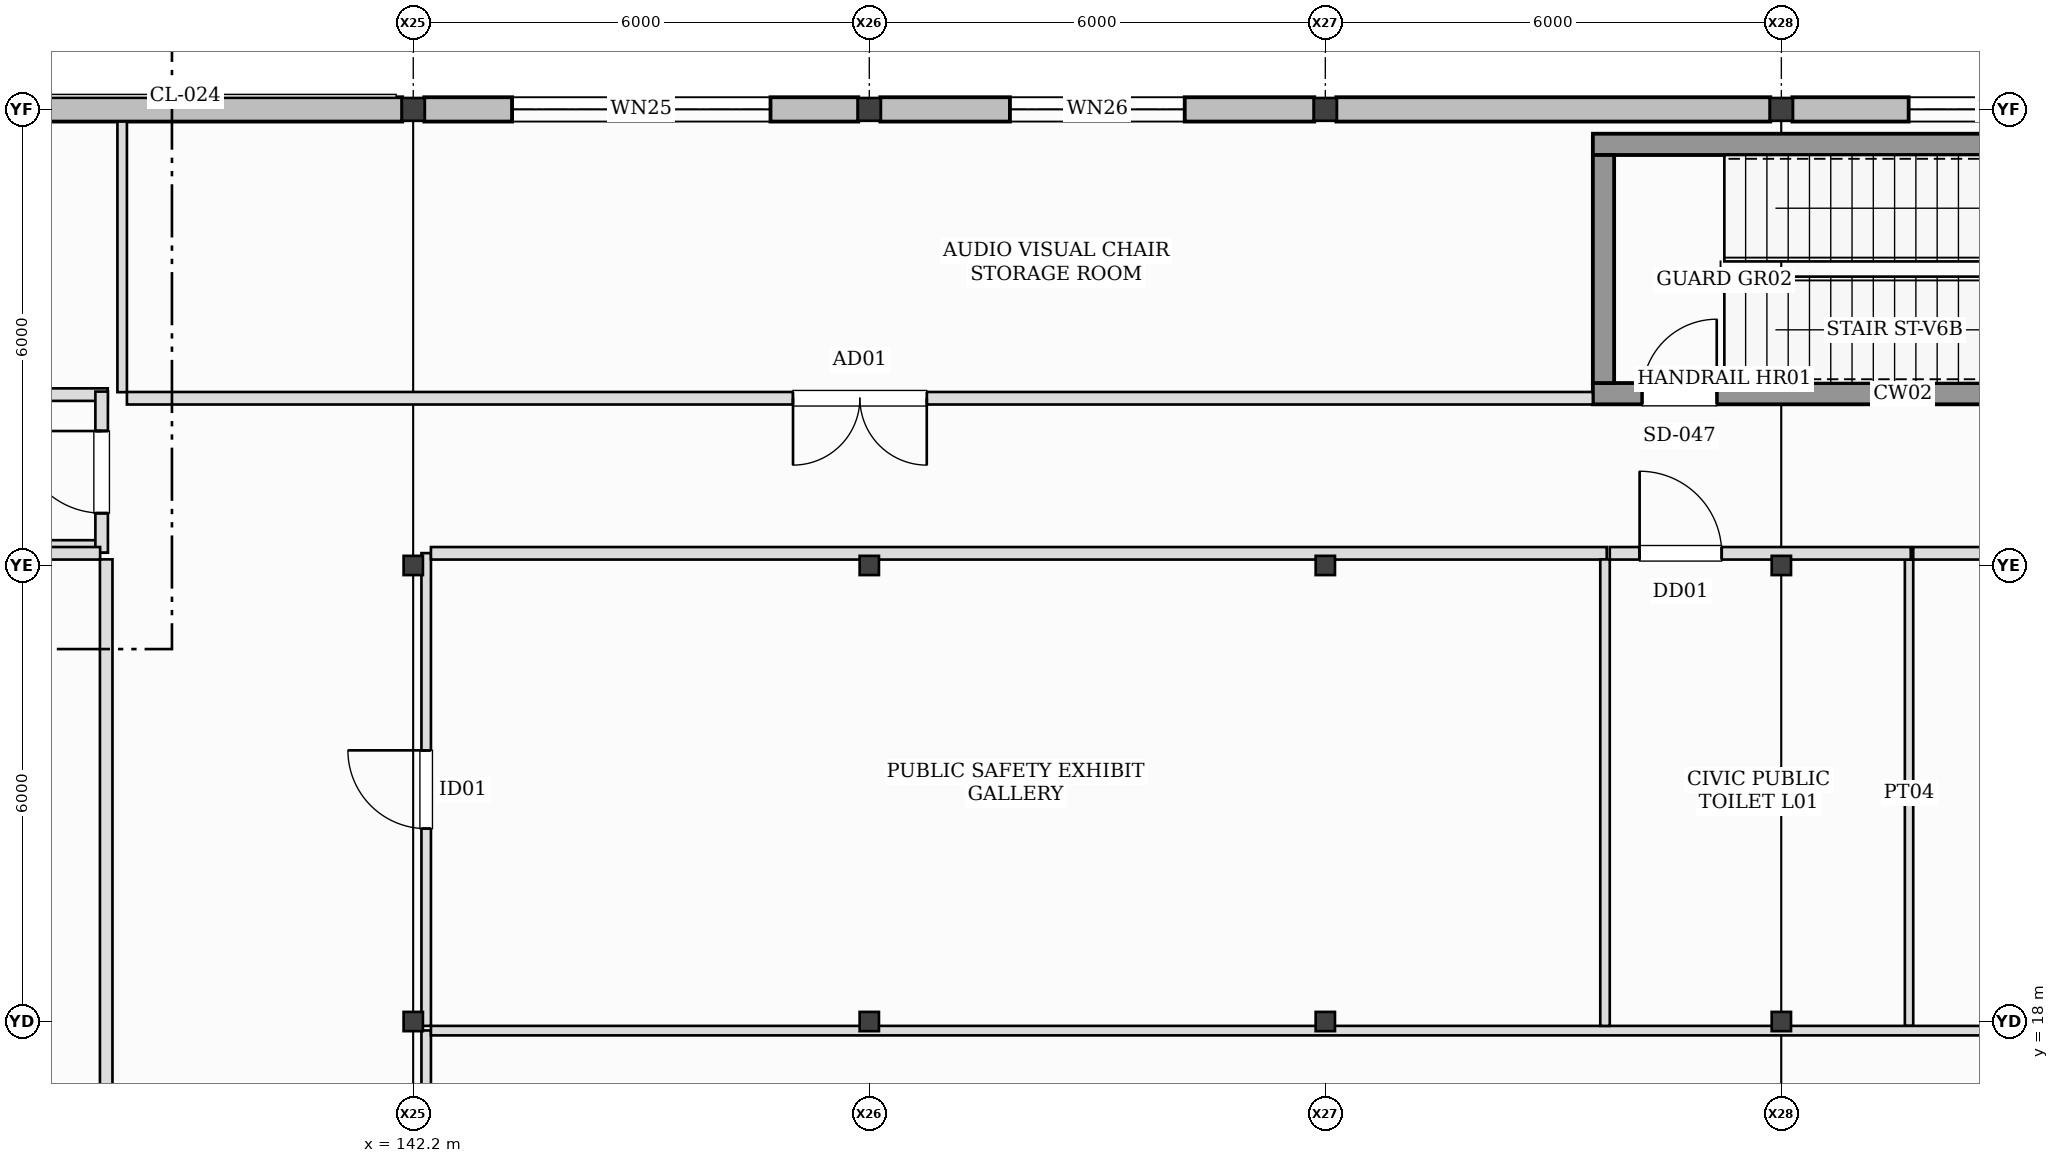
"""IFC4 building model, lengths in metres.
Left out: names, types, materials, properties, quantities, classifications, styles, units other than length and angle.
Written with IfcOpenShell. Run it as: python <this file> out.ifc"""

import sys

from ifc_helpers import new_model, si_unit, direction, frame, frame_2d, origin, origin_2d, place, context, subcontext, project, spatial, rectangle, hollow_rectangle, i_section, extrude, element, fill, save


model = new_model("IFC4")
c1 = context("Model", 3, precision=1e-05, world=origin(), true_north=direction((0.0, 1.0)))
c2 = subcontext(c1, "Body", "Model", "MODEL_VIEW")
j1 = project(units=[si_unit("LENGTHUNIT", "METRE"), si_unit("PLANEANGLEUNIT", "RADIAN")], contexts=[c1])
p1 = place(None, origin())
s1 = spatial("IfcSite", under=j1, at=p1, CompositionType="ELEMENT")
p2 = place(p1, origin())
s2 = spatial("IfcBuilding", under=s1, at=p2, CompositionType="ELEMENT")
p3 = place(p2, origin())
s3 = spatial("IfcBuildingStorey", under=s2, at=p3, CompositionType="ELEMENT", Elevation=0.0)
for number, where, z_axis, x_axis in (
    (1, (142.2, 18.0, -0.41), (0.0, 0.0, 1.0), (1.0, 0.0, 0.0)),
    (2, (142.2, 24.0, -0.41), (0.0, 0.0, 1.0), (1.0, 0.0, 0.0)),
):
    element("IfcColumn", number, at=place(p3, frame(where, z_axis=z_axis, x_axis=x_axis)), inside=s3, PredefinedType="COLUMN", context=c2, shape_type="SweptSolid", body=[
        extrude(i_section(OverallWidth=0.254, OverallDepth=0.253, WebThickness=0.009, FlangeThickness=0.014, at=origin_2d()), origin(), (0.0, 0.0, 1.0), 6.41),
    ])
p4 = place(p3, frame((142.2, 30.0, -0.41), z_axis=(0.0, 0.0, 1.0), x_axis=(1.0, 0.0, 0.0)))
e3 = element("IfcColumn", 3, at=p4, inside=s3, PredefinedType="COLUMN", context=c2, shape_type="SweptSolid", body=[
    extrude(hollow_rectangle(XDim=0.3, YDim=0.3, WallThickness=0.012, at=origin_2d()), origin(), (0.0, 0.0, 1.0), 6.41),
])
for number, where, z_axis, x_axis in (
    (4, (148.2, 18.0, -0.41), (0.0, 0.0, 1.0), (1.0, 0.0, 0.0)),
    (5, (148.2, 24.0, -0.41), (0.0, 0.0, 1.0), (1.0, 0.0, 0.0)),
):
    element("IfcColumn", number, at=place(p3, frame(where, z_axis=z_axis, x_axis=x_axis)), inside=s3, PredefinedType="COLUMN", context=c2, shape_type="SweptSolid", body=[
        extrude(i_section(OverallWidth=0.254, OverallDepth=0.253, WebThickness=0.009, FlangeThickness=0.014, at=origin_2d()), origin(), (0.0, 0.0, 1.0), 6.41),
    ])
p5 = place(p3, frame((148.2, 30.0, -0.41), z_axis=(0.0, 0.0, 1.0), x_axis=(1.0, 0.0, 0.0)))
e6 = element("IfcColumn", 6, at=p5, inside=s3, PredefinedType="COLUMN", context=c2, shape_type="SweptSolid", body=[
    extrude(hollow_rectangle(XDim=0.3, YDim=0.3, WallThickness=0.012, at=origin_2d()), origin(), (0.0, 0.0, 1.0), 6.41),
])
for number, where, z_axis, x_axis in (
    (7, (154.2, 18.0, -0.41), (0.0, 0.0, 1.0), (1.0, 0.0, 0.0)),
    (8, (154.2, 24.0, -0.41), (0.0, 0.0, 1.0), (1.0, 0.0, 0.0)),
):
    element("IfcColumn", number, at=place(p3, frame(where, z_axis=z_axis, x_axis=x_axis)), inside=s3, PredefinedType="COLUMN", context=c2, shape_type="SweptSolid", body=[
        extrude(i_section(OverallWidth=0.254, OverallDepth=0.253, WebThickness=0.009, FlangeThickness=0.014, at=origin_2d()), origin(), (0.0, 0.0, 1.0), 6.41),
    ])
p6 = place(p3, frame((154.2, 30.0, -0.41), z_axis=(0.0, 0.0, 1.0), x_axis=(1.0, 0.0, 0.0)))
e9 = element("IfcColumn", 9, at=p6, inside=s3, PredefinedType="COLUMN", context=c2, shape_type="SweptSolid", body=[
    extrude(hollow_rectangle(XDim=0.3, YDim=0.3, WallThickness=0.012, at=origin_2d()), origin(), (0.0, 0.0, 1.0), 6.41),
])
for number, where, z_axis, x_axis in (
    (10, (160.2, 18.0, -0.41), (0.0, 0.0, 1.0), (1.0, 0.0, 0.0)),
    (11, (160.2, 24.0, -0.41), (0.0, 0.0, 1.0), (1.0, 0.0, 0.0)),
):
    element("IfcColumn", number, at=place(p3, frame(where, z_axis=z_axis, x_axis=x_axis)), inside=s3, PredefinedType="COLUMN", context=c2, shape_type="SweptSolid", body=[
        extrude(i_section(OverallWidth=0.254, OverallDepth=0.253, WebThickness=0.009, FlangeThickness=0.014, at=origin_2d()), origin(), (0.0, 0.0, 1.0), 6.41),
    ])
p7 = place(p3, frame((160.2, 30.0, -0.41), z_axis=(0.0, 0.0, 1.0), x_axis=(1.0, 0.0, 0.0)))
e12 = element("IfcColumn", 12, at=p7, inside=s3, PredefinedType="COLUMN", context=c2, shape_type="SweptSolid", body=[
    extrude(hollow_rectangle(XDim=0.3, YDim=0.3, WallThickness=0.012, at=origin_2d()), origin(), (0.0, 0.0, 1.0), 6.41),
])
p8 = place(p3, frame((142.055, 30.0, 0.0), z_axis=(0.0, 0.0, 1.0), x_axis=(-1.0, 0.0, 0.0)))
e13 = element("IfcWall", 13, at=p8, inside=s3, PredefinedType="STANDARD", context=c2, shape_type="SweptSolid", body=[
    extrude(rectangle(XDim=5.71, YDim=0.32, at=frame_2d((2.855, 0.0))), origin(), (0.0, 0.0, 1.0), 5.035),
])
p9 = place(p3, frame((148.055, 30.0, 0.0), z_axis=(0.0, 0.0, 1.0), x_axis=(-1.0, 0.0, 0.0)))
e14 = element("IfcWall", 14, at=p9, inside=s3, PredefinedType="STANDARD", context=c2, shape_type="SweptSolid", body=[
    extrude(rectangle(XDim=5.71, YDim=0.32, at=frame_2d((2.855, 0.0))), origin(), (0.0, 0.0, 1.0), 5.035),
])
p10 = place(p9, frame((1.155, 0.0, 0.85)))
e15 = element("IfcOpeningElement", 15, at=p10, cuts=e14, PredefinedType="OPENING", context=c2, shape_type="SweptSolid", body=[
    extrude(rectangle(XDim=3.4, YDim=1.75, at=frame_2d((1.7, 0.875))), frame((0.0, 0.17, 0.0), z_axis=(0.0, -1.0, 0.0), x_axis=(1.0, 0.0, 0.0)), (0.0, 0.0, 1.0), 0.34),
])
p11 = place(p3, frame((154.055, 30.0, 0.0), z_axis=(0.0, 0.0, 1.0), x_axis=(-1.0, 0.0, 0.0)))
e16 = element("IfcWall", 16, at=p11, inside=s3, PredefinedType="STANDARD", context=c2, shape_type="SweptSolid", body=[
    extrude(rectangle(XDim=5.71, YDim=0.32, at=frame_2d((2.855, 0.0))), origin(), (0.0, 0.0, 1.0), 5.035),
])
p12 = place(p11, frame((1.705, 0.0, 1.0)))
e17 = element("IfcOpeningElement", 17, at=p12, cuts=e16, PredefinedType="OPENING", context=c2, shape_type="SweptSolid", body=[
    extrude(rectangle(XDim=2.3, YDim=0.88, at=frame_2d((1.15, 0.44))), frame((0.0, 0.17, 0.0), z_axis=(0.0, -1.0, 0.0), x_axis=(1.0, 0.0, 0.0)), (0.0, 0.0, 1.0), 0.34),
])
p13 = place(p3, frame((160.055, 30.0, 0.0), z_axis=(0.0, 0.0, 1.0), x_axis=(-1.0, 0.0, 0.0)))
e18 = element("IfcWall", 18, at=p13, inside=s3, PredefinedType="STANDARD", context=c2, shape_type="SweptSolid", body=[
    extrude(rectangle(XDim=5.71, YDim=0.32, at=frame_2d((2.855, 0.0))), origin(), (0.0, 0.0, 1.0), 5.035),
])
p14 = place(p3, frame((166.055, 30.0, 0.0), z_axis=(0.0, 0.0, 1.0), x_axis=(-1.0, 0.0, 0.0)))
e19 = element("IfcWall", 19, at=p14, inside=s3, PredefinedType="STANDARD", context=c2, shape_type="SweptSolid", body=[
    extrude(rectangle(XDim=5.71, YDim=0.32, at=frame_2d((2.855, 0.0))), origin(), (0.0, 0.0, 1.0), 5.035),
])
p15 = place(p14, frame((1.53, 0.0, 1.0)))
e20 = element("IfcOpeningElement", 20, at=p15, cuts=e19, PredefinedType="OPENING", context=c2, shape_type="SweptSolid", body=[
    extrude(rectangle(XDim=2.65, YDim=0.88, at=frame_2d((1.325, 0.44))), frame((0.0, 0.17, 0.0), z_axis=(0.0, -1.0, 0.0), x_axis=(1.0, 0.0, 0.0)), (0.0, 0.0, 1.0), 0.34),
])
p16 = place(p3, frame((157.72, 26.26, 0.0), z_axis=(0.0, 0.0, 1.0), x_axis=(1.0, 0.0, 0.0)))
e21 = element("IfcWall", 21, at=p16, inside=s3, PredefinedType="SHEAR", context=c2, shape_type="SweptSolid", body=[
    extrude(rectangle(XDim=8.16, YDim=0.28, at=frame_2d((4.08, 0.0))), origin(), (0.0, 0.0, 1.0), 6.0),
])
p17 = place(p16, frame((0.65, 0.0, 0.0)))
e22 = element("IfcOpeningElement", 22, at=p17, cuts=e21, PredefinedType="OPENING", context=c2, shape_type="SweptSolid", body=[
    extrude(rectangle(XDim=0.98, YDim=2.15, at=frame_2d((0.49, 1.075))), frame((0.0, 0.15, 0.0), z_axis=(0.0, -1.0, 0.0), x_axis=(1.0, 0.0, 0.0)), (0.0, 0.0, 1.0), 0.3),
])
p18 = place(p3, frame((165.88, 29.54, 0.0), z_axis=(0.0, 0.0, 1.0), x_axis=(-1.0, 0.0, 0.0)))
e23 = element("IfcWall", 23, at=p18, inside=s3, PredefinedType="SHEAR", context=c2, shape_type="SweptSolid", body=[
    extrude(rectangle(XDim=8.16, YDim=0.28, at=frame_2d((4.08, 0.0))), origin(), (0.0, 0.0, 1.0), 6.0),
])
p19 = place(p3, frame((157.86, 29.4, 0.0), z_axis=(0.0, 0.0, 1.0), x_axis=(0.0, -1.0, 0.0)))
e24 = element("IfcWall", 24, at=p19, inside=s3, PredefinedType="SHEAR", context=c2, shape_type="SweptSolid", body=[
    extrude(rectangle(XDim=3.0, YDim=0.28, at=frame_2d((1.5, 0.0))), origin(), (0.0, 0.0, 1.0), 6.0),
])
p20 = place(p3, frame((133.02, 24.25, 0.0), z_axis=(0.0, 0.0, 1.0), x_axis=(1.0, 0.0, 0.0)))
e25 = element("IfcWall", 25, at=p20, inside=s3, PredefinedType="PARTITIONING", context=c2, shape_type="SweptSolid", body=[
    extrude(rectangle(XDim=5.16, YDim=0.165, at=frame_2d((2.58, 0.0))), origin(), (0.0, 0.0, 1.0), 5.035),
])
p21 = place(p3, frame((137.065, 26.248, 0.0), z_axis=(0.0, 0.0, 1.0), x_axis=(1.0, 0.0, 0.0)))
e26 = element("IfcWall", 26, at=p21, inside=s3, PredefinedType="PARTITIONING", context=c2, shape_type="SweptSolid", body=[
    extrude(rectangle(XDim=1.115, YDim=0.165, at=frame_2d((0.558, 0.0))), origin(), (0.0, 0.0, 1.0), 5.68),
])
p22 = place(p3, frame((138.1, 24.17, 0.0), z_axis=(0.0, 0.0, 1.0), x_axis=(0.0, 1.0, 0.0)))
e27 = element("IfcWall", 27, at=p22, inside=s3, PredefinedType="PARTITIONING", context=c2, shape_type="SweptSolid", body=[
    extrude(rectangle(XDim=2.118, YDim=0.165, at=frame_2d((1.059, 0.0))), origin(), (0.0, 0.0, 1.0), 5.294),
])
p23 = place(p22, frame((0.519, 0.0, 0.0)))
e28 = element("IfcOpeningElement", 28, at=p23, cuts=e27, PredefinedType="OPENING", context=c2, shape_type="SweptSolid", body=[
    extrude(rectangle(XDim=1.08, YDim=2.14, at=frame_2d((0.54, 1.07))), frame((0.0, 0.093, 0.0), z_axis=(0.0, -1.0, 0.0), x_axis=(1.0, 0.0, 0.0)), (0.0, 0.0, 1.0), 0.185),
])
p24 = place(p3, frame((142.37, 1.945, 0.0), z_axis=(0.0, 0.0, 1.0), x_axis=(0.0, 1.0, 0.0)))
e29 = element("IfcWall", 29, at=p24, inside=s3, PredefinedType="PARTITIONING", context=c2, shape_type="SweptSolid", body=[
    extrude(rectangle(XDim=15.938, YDim=0.125, at=frame_2d((7.969, 0.0))), origin(), (0.0, 0.0, 1.0), 5.044),
])
p25 = place(p24, frame((7.268, 0.0, 0.0)))
e30 = element("IfcOpeningElement", 30, at=p25, cuts=e29, PredefinedType="OPENING", context=c2, shape_type="SweptSolid", body=[
    extrude(rectangle(XDim=1.18, YDim=2.16, at=frame_2d((0.59, 1.08))), frame((0.0, 0.073, 0.0), z_axis=(0.0, -1.0, 0.0), x_axis=(1.0, 0.0, 0.0)), (0.0, 0.0, 1.0), 0.145),
])
p26 = place(p3, frame((142.433, 17.88, 0.0), z_axis=(0.0, 0.0, 1.0), x_axis=(1.0, 0.0, 0.0)))
e31 = element("IfcWall", 31, at=p26, inside=s3, PredefinedType="PARTITIONING", context=c2, shape_type="SweptSolid", body=[
    extrude(rectangle(XDim=23.607, YDim=0.125, at=frame_2d((11.804, 0.0))), origin(), (0.0, 0.0, 1.0), 5.035),
])
p27 = place(p3, frame((124.397, 24.16, 0.0), z_axis=(0.0, 0.0, 1.0), x_axis=(1.0, 0.0, 0.0)))
e32 = element("IfcWall", 32, at=p27, inside=s3, PredefinedType="PARTITIONING", context=c2, shape_type="SweptSolid", body=[
    extrude(rectangle(XDim=13.683, YDim=0.165, at=frame_2d((6.841, 0.0))), origin(), (0.0, 0.0, 1.0), 5.035),
])
p28 = place(p27, frame((6.61, 0.0, 0.0)))
e33 = element("IfcOpeningElement", 33, at=p28, cuts=e32, PredefinedType="OPENING", context=c2, shape_type="SweptSolid", body=[
    extrude(rectangle(XDim=1.13, YDim=2.18, at=frame_2d((0.565, 1.09))), frame((0.0, 0.093, 0.0), z_axis=(0.0, -1.0, 0.0), x_axis=(1.0, 0.0, 0.0)), (0.0, 0.0, 1.0), 0.185),
])
p29 = place(p3, frame((138.16, 24.08, 0.0), z_axis=(0.0, 0.0, 1.0), x_axis=(0.0, -1.0, 0.0)))
e34 = element("IfcWall", 34, at=p29, inside=s3, PredefinedType="PARTITIONING", context=c2, shape_type="SweptSolid", body=[
    extrude(rectangle(XDim=10.338, YDim=0.165, at=frame_2d((5.169, 0.0))), origin(), (0.0, 0.0, 1.0), 5.249),
])
p30 = place(p3, frame((142.37, 17.942, 0.0), z_axis=(0.0, 0.0, 1.0), x_axis=(0.0, 1.0, 0.0)))
e35 = element("IfcWall", 35, at=p30, inside=s3, PredefinedType="PARTITIONING", context=c2, shape_type="SweptSolid", body=[
    extrude(rectangle(XDim=6.22, YDim=0.125, at=frame_2d((3.11, 0.0))), origin(), (0.0, 0.0, 1.0), 5.044),
])
p31 = place(p30, frame((2.595, 0.0, 0.0)))
e36 = element("IfcOpeningElement", 36, at=p31, cuts=e35, PredefinedType="OPENING", context=c2, shape_type="SweptSolid", body=[
    extrude(rectangle(XDim=1.03, YDim=2.15, at=frame_2d((0.515, 1.075))), frame((0.0, 0.073, 0.0), z_axis=(0.0, -1.0, 0.0), x_axis=(1.0, 0.0, 0.0)), (0.0, 0.0, 1.0), 0.145),
])
p32 = place(p3, frame((142.433, 24.16, 0.0), z_axis=(0.0, 0.0, 1.0), x_axis=(1.0, 0.0, 0.0)))
e37 = element("IfcWall", 37, at=p32, inside=s3, PredefinedType="PARTITIONING", context=c2, shape_type="SweptSolid", body=[
    extrude(rectangle(XDim=15.47, YDim=0.165, at=frame_2d((7.735, 0.0))), origin(), (0.0, 0.0, 1.0), 5.035),
])
p33 = place(p3, frame((157.88, 24.08, 0.0), z_axis=(0.0, 0.0, 1.0), x_axis=(0.0, -1.0, 0.0)))
e38 = element("IfcWall", 38, at=p33, inside=s3, PredefinedType="PARTITIONING", context=c2, shape_type="SweptSolid", body=[
    extrude(rectangle(XDim=6.138, YDim=0.125, at=frame_2d((3.069, 0.0))), origin(), (0.0, 0.0, 1.0), 5.339),
])
p34 = place(p3, frame((157.942, 24.16, 0.0), z_axis=(0.0, 0.0, 1.0), x_axis=(1.0, 0.0, 0.0)))
e39 = element("IfcWall", 39, at=p34, inside=s3, PredefinedType="PARTITIONING", context=c2, shape_type="SweptSolid", body=[
    extrude(rectangle(XDim=3.96, YDim=0.165, at=frame_2d((1.98, 0.0))), origin(), (0.0, 0.0, 1.0), 5.035),
])
p35 = place(p34, frame((0.393, 0.0, 0.0)))
e40 = element("IfcOpeningElement", 40, at=p35, cuts=e39, PredefinedType="OPENING", context=c2, shape_type="SweptSolid", body=[
    extrude(rectangle(XDim=1.08, YDim=2.14, at=frame_2d((0.54, 1.07))), frame((0.0, 0.093, 0.0), z_axis=(0.0, -1.0, 0.0), x_axis=(1.0, 0.0, 0.0)), (0.0, 0.0, 1.0), 0.185),
])
p36 = place(p3, frame((161.88, 24.08, 0.0), z_axis=(0.0, 0.0, 1.0), x_axis=(0.0, -1.0, 0.0)))
e41 = element("IfcWall", 41, at=p36, inside=s3, PredefinedType="PARTITIONING", context=c2, shape_type="SweptSolid", body=[
    extrude(rectangle(XDim=6.138, YDim=0.11, at=frame_2d((3.069, 0.0))), origin(), (0.0, 0.0, 1.0), 5.39),
])
p37 = place(p3, frame((161.935, 24.16, 0.0), z_axis=(0.0, 0.0, 1.0), x_axis=(1.0, 0.0, 0.0)))
e42 = element("IfcWall", 42, at=p37, inside=s3, PredefinedType="PARTITIONING", context=c2, shape_type="SweptSolid", body=[
    extrude(rectangle(XDim=4.105, YDim=0.165, at=frame_2d((2.052, 0.0))), origin(), (0.0, 0.0, 1.0), 5.035),
])
p38 = place(p37, frame((1.512, 0.0, 0.0)))
e43 = element("IfcOpeningElement", 43, at=p38, cuts=e42, PredefinedType="OPENING", context=c2, shape_type="SweptSolid", body=[
    extrude(rectangle(XDim=1.08, YDim=2.14, at=frame_2d((0.54, 1.07))), frame((0.0, 0.093, 0.0), z_axis=(0.0, -1.0, 0.0), x_axis=(1.0, 0.0, 0.0)), (0.0, 0.0, 1.0), 0.185),
])
p39 = place(p3, frame((138.37, 26.28, 0.0), z_axis=(0.0, 0.0, 1.0), x_axis=(0.0, 1.0, 0.0)))
e44 = element("IfcWall", 44, at=p39, inside=s3, PredefinedType="PARTITIONING", context=c2, shape_type="SweptSolid", body=[
    extrude(rectangle(XDim=3.56, YDim=0.125, at=frame_2d((1.78, 0.0))), origin(), (0.0, 0.0, 1.0), 5.294),
])
p40 = place(p3, frame((157.72, 26.2, 0.0), z_axis=(0.0, 0.0, 1.0), x_axis=(-1.0, 0.0, 0.0)))
e45 = element("IfcWall", 45, at=p40, inside=s3, PredefinedType="PARTITIONING", context=c2, shape_type="SweptSolid", body=[
    extrude(rectangle(XDim=19.287, YDim=0.165, at=frame_2d((9.644, 0.0))), origin(), (0.0, 0.0, 1.0), 5.68),
])
p41 = place(p40, frame((8.764, 0.0, 0.0)))
e46 = element("IfcOpeningElement", 46, at=p41, cuts=e45, PredefinedType="OPENING", context=c2, shape_type="SweptSolid", body=[
    extrude(rectangle(XDim=1.76, YDim=2.26, at=frame_2d((0.88, 1.13))), frame((0.0, 0.093, 0.0), z_axis=(0.0, -1.0, 0.0), x_axis=(1.0, 0.0, 0.0)), (0.0, 0.0, 1.0), 0.185),
])
p42 = place(p10, origin())
e47 = element("IfcWindow", 47, at=p42, inside=s3, PartitioningType="SINGLE_PANEL", PredefinedType="WINDOW", context=c2, shape_type="SweptSolid", body=[
    extrude(rectangle(XDim=3.4, YDim=1.75, at=frame_2d((1.7, 0.875))), frame((0.0, 0.03, 0.0), z_axis=(0.0, -1.0, 0.0), x_axis=(1.0, 0.0, 0.0)), (0.0, 0.0, 1.0), 0.06),
])
fill(e15, e47)
p43 = place(p12, origin())
e48 = element("IfcWindow", 48, at=p43, inside=s3, PartitioningType="SINGLE_PANEL", PredefinedType="WINDOW", context=c2, shape_type="SweptSolid", body=[
    extrude(rectangle(XDim=2.3, YDim=0.88, at=frame_2d((1.15, 0.44))), frame((0.0, 0.03, 0.0), z_axis=(0.0, -1.0, 0.0), x_axis=(1.0, 0.0, 0.0)), (0.0, 0.0, 1.0), 0.06),
])
fill(e17, e48)
p44 = place(p15, origin())
e49 = element("IfcWindow", 49, at=p44, inside=s3, PartitioningType="SINGLE_PANEL", PredefinedType="WINDOW", context=c2, shape_type="SweptSolid", body=[
    extrude(rectangle(XDim=2.65, YDim=0.88, at=frame_2d((1.325, 0.44))), frame((0.0, 0.03, 0.0), z_axis=(0.0, -1.0, 0.0), x_axis=(1.0, 0.0, 0.0)), (0.0, 0.0, 1.0), 0.06),
])
fill(e20, e49)
p45 = place(p17, origin())
e50 = element("IfcDoor", 50, at=p45, inside=s3, OperationType="SINGLE_SWING_RIGHT", PredefinedType="DOOR", context=c2, shape_type="SweptSolid", body=[
    extrude(rectangle(XDim=0.98, YDim=2.15, at=frame_2d((0.49, 1.075))), frame((0.0, 0.025, 0.0), z_axis=(0.0, -1.0, 0.0), x_axis=(1.0, 0.0, 0.0)), (0.0, 0.0, 1.0), 0.05),
])
fill(e22, e50)
p46 = place(p23, origin())
e51 = element("IfcDoor", 51, at=p46, inside=s3, OperationType="SINGLE_SWING_RIGHT", PredefinedType="DOOR", context=c2, shape_type="SweptSolid", body=[
    extrude(rectangle(XDim=1.08, YDim=2.14, at=frame_2d((0.54, 1.07))), frame((0.0, 0.025, 0.0), z_axis=(0.0, -1.0, 0.0), x_axis=(1.0, 0.0, 0.0)), (0.0, 0.0, 1.0), 0.05),
])
fill(e28, e51)
p47 = place(p31, origin())
e52 = element("IfcDoor", 52, at=p47, inside=s3, OperationType="SINGLE_SWING_RIGHT", PredefinedType="DOOR", context=c2, shape_type="SweptSolid", body=[
    extrude(rectangle(XDim=1.03, YDim=2.15, at=frame_2d((0.515, 1.075))), frame((0.0, 0.025, 0.0), z_axis=(0.0, -1.0, 0.0), x_axis=(1.0, 0.0, 0.0)), (0.0, 0.0, 1.0), 0.05),
])
fill(e36, e52)
p48 = place(p35, frame((1.08, 0.0, 0.0), z_axis=(0.0, 0.0, 1.0), x_axis=(-1.0, 0.0, 0.0)))
e53 = element("IfcDoor", 53, at=p48, inside=s3, OperationType="SINGLE_SWING_LEFT", PredefinedType="DOOR", context=c2, shape_type="SweptSolid", body=[
    extrude(rectangle(XDim=1.08, YDim=2.14, at=frame_2d((0.54, 1.07))), frame((0.0, 0.025, 0.0), z_axis=(0.0, -1.0, 0.0), x_axis=(1.0, 0.0, 0.0)), (0.0, 0.0, 1.0), 0.05),
])
fill(e40, e53)
p49 = place(p41, frame((1.76, 0.0, 0.0), z_axis=(0.0, 0.0, 1.0), x_axis=(-1.0, 0.0, 0.0)))
e54 = element("IfcDoor", 54, at=p49, inside=s3, OperationType="DOUBLE_DOOR_SINGLE_SWING", PredefinedType="DOOR", context=c2, shape_type="SweptSolid", body=[
    extrude(rectangle(XDim=1.76, YDim=2.26, at=frame_2d((0.88, 1.13))), frame((0.0, 0.025, 0.0), z_axis=(0.0, -1.0, 0.0), x_axis=(1.0, 0.0, 0.0)), (0.0, 0.0, 1.0), 0.05),
])
fill(e46, e54)
save(model, sys.argv[1])
